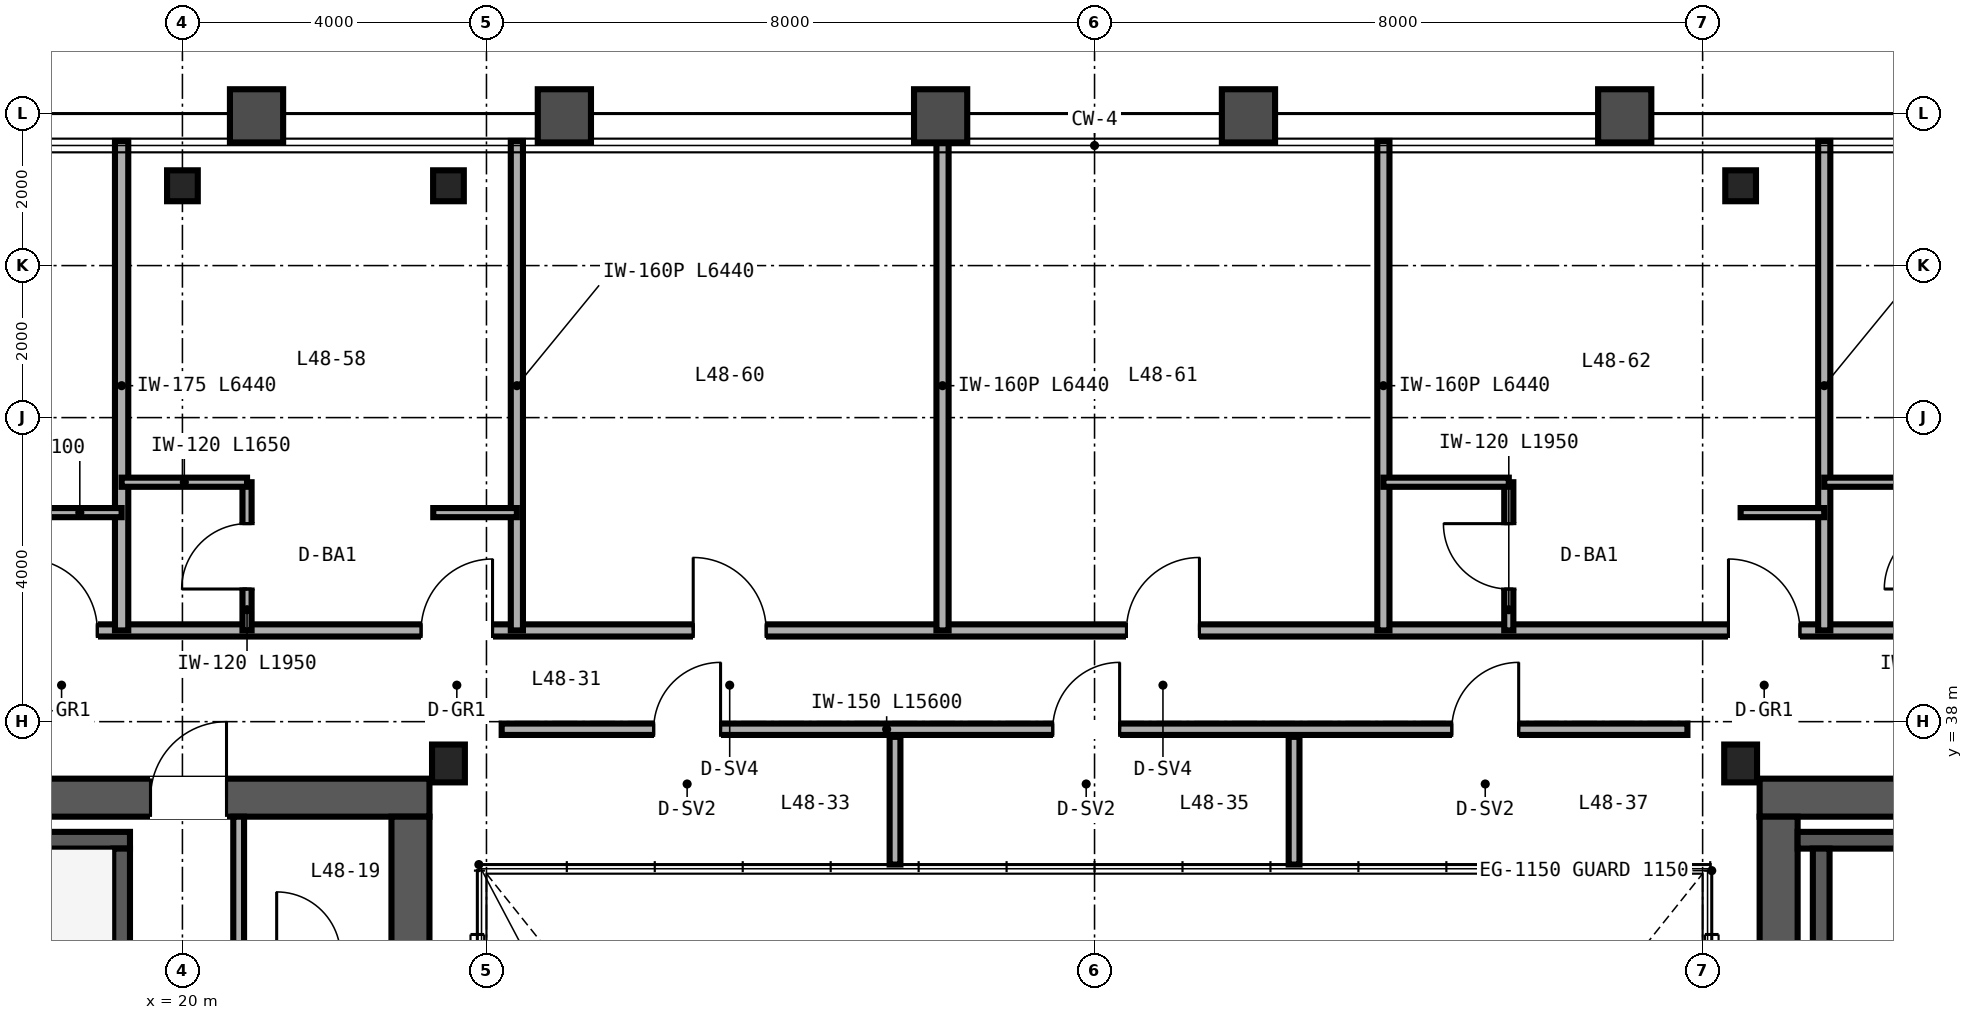
"""IFC4 building model, lengths in metres.
Left out: names, types, materials, properties, quantities, classifications, styles, units other than length and angle.
Written with IfcOpenShell. Run it as: python <this file> out.ifc"""

import sys

from ifc_helpers import new_model, si_unit, direction, frame, frame_2d, origin, origin_2d, place, context, subcontext, project, spatial, rectangle, i_section, extrude, source, transform, mapped, element, fill, save


model = new_model("IFC4")
c1 = context("Model", 3, precision=1e-05, world=origin(), true_north=direction((0.0, 1.0)))
c2 = subcontext(c1, "Body", "Model", "MODEL_VIEW")
j1 = project(units=[si_unit("LENGTHUNIT", "METRE"), si_unit("PLANEANGLEUNIT", "RADIAN")], contexts=[c1])
p1 = place(None, origin())
s1 = spatial("IfcSite", under=j1, at=p1, CompositionType="ELEMENT")
p2 = place(p1, origin())
s2 = spatial("IfcBuilding", under=s1, at=p2, CompositionType="ELEMENT")
p3 = place(p2, frame((0.0, 0.0, 192.0)))
s3 = spatial("IfcBuildingStorey", under=s2, at=p3, CompositionType="ELEMENT", Elevation=192.0)
p4 = place(p3, frame((10.75, 37.0, 0.0), z_axis=(0.0, 0.0, 1.0), x_axis=(1.0, 0.0, 0.0)))
e1 = element("IfcWall", 1, at=p4, inside=s3, PredefinedType="SHEAR", context=c2, shape_type="SweptSolid", body=[
    extrude(rectangle(XDim=12.5, YDim=0.5, at=frame_2d((6.25, 0.0))), origin(), (0.0, 0.0, 1.0), 3.37),
])
p5 = place(p4, frame((8.83, 0.0, 0.0)))
e2 = element("IfcOpeningElement", 2, at=p5, cuts=e1, PredefinedType="OPENING", context=c2, shape_type="SweptSolid", body=[
    extrude(rectangle(XDim=1.0, YDim=2.15, at=frame_2d((0.5, 1.075))), frame((0.0, 0.26, 0.0), z_axis=(0.0, -1.0, 0.0), x_axis=(1.0, 0.0, 0.0)), (0.0, 0.0, 1.0), 0.52),
])
p6 = place(p3, frame((23.0, 15.25, 0.0), z_axis=(0.0, 0.0, 1.0), x_axis=(0.0, 1.0, 0.0)))
e3 = element("IfcWall", 3, at=p6, inside=s3, PredefinedType="SHEAR", context=c2, shape_type="SweptSolid", body=[
    extrude(rectangle(XDim=21.5, YDim=0.5, at=frame_2d((10.75, 0.0))), origin(), (0.0, 0.0, 1.0), 3.37),
])
p7 = place(p3, frame((40.75, 37.0, 0.0), z_axis=(0.0, 0.0, 1.0), x_axis=(1.0, 0.0, 0.0)))
e4 = element("IfcWall", 4, at=p7, inside=s3, PredefinedType="SHEAR", context=c2, shape_type="SweptSolid", body=[
    extrude(rectangle(XDim=12.5, YDim=0.5, at=frame_2d((6.25, 0.0))), origin(), (0.0, 0.0, 1.0), 3.37),
])
p8 = place(p7, frame((9.95, 0.0, 0.0)))
e5 = element("IfcOpeningElement", 5, at=p8, cuts=e4, PredefinedType="OPENING", context=c2, shape_type="SweptSolid", body=[
    extrude(rectangle(XDim=1.1, YDim=2.15, at=frame_2d((0.55, 1.075))), frame((0.0, 0.26, 0.0), z_axis=(0.0, -1.0, 0.0), x_axis=(1.0, 0.0, 0.0)), (0.0, 0.0, 1.0), 0.52),
])
p9 = place(p3, frame((41.0, 15.25, 0.0), z_axis=(0.0, 0.0, 1.0), x_axis=(0.0, 1.0, 0.0)))
e6 = element("IfcWall", 6, at=p9, inside=s3, PredefinedType="SHEAR", context=c2, shape_type="SweptSolid", body=[
    extrude(rectangle(XDim=21.5, YDim=0.5, at=frame_2d((10.75, 0.0))), origin(), (0.0, 0.0, 1.0), 3.37),
])
p10 = place(p3, frame((11.25, 36.44, 0.0), z_axis=(0.0, 0.0, 1.0), x_axis=(1.0, 0.0, 0.0)))
e7 = element("IfcWall", 7, at=p10, inside=s3, PredefinedType="SHEAR", context=c2, shape_type="SweptSolid", body=[
    extrude(rectangle(XDim=8.06, YDim=0.22, at=frame_2d((4.03, 0.0))), origin(), (0.0, 0.0, 1.0), 3.4),
])
p11 = place(p3, frame((19.2, 33.05, 0.0), z_axis=(0.0, 0.0, 1.0), x_axis=(0.0, 1.0, 0.0)))
e8 = element("IfcWall", 8, at=p11, inside=s3, PredefinedType="SHEAR", context=c2, shape_type="SweptSolid", body=[
    extrude(rectangle(XDim=3.28, YDim=0.22, at=frame_2d((1.64, 0.0))), origin(), (0.0, 0.0, 1.0), 3.4),
])
p12 = place(p3, frame((41.25, 36.44, 0.0), z_axis=(0.0, 0.0, 1.0), x_axis=(1.0, 0.0, 0.0)))
e9 = element("IfcWall", 9, at=p12, inside=s3, PredefinedType="SHEAR", context=c2, shape_type="SweptSolid", body=[
    extrude(rectangle(XDim=8.06, YDim=0.22, at=frame_2d((4.03, 0.0))), origin(), (0.0, 0.0, 1.0), 3.4),
])
p13 = place(p3, frame((41.56, 33.05, 0.0), z_axis=(0.0, 0.0, 1.0), x_axis=(0.0, 1.0, 0.0)))
e10 = element("IfcWall", 10, at=p13, inside=s3, PredefinedType="SHEAR", context=c2, shape_type="SweptSolid", body=[
    extrude(rectangle(XDim=3.28, YDim=0.22, at=frame_2d((1.64, 0.0))), origin(), (0.0, 0.0, 1.0), 3.4),
])
m1 = source(origin(), c2, "Body", "SweptSolid", [
    extrude(i_section(OverallWidth=0.432, OverallDepth=0.498, WebThickness=0.056, FlangeThickness=0.089, FilletRadius=0.025, at=origin_2d()), origin(), (0.0, 0.0, 1.0), 3.37),
])
for number, where, z_axis, x_axis in (
    (11, (23.5, 37.45, 0.0), (0.0, 0.0, 1.0), (1.0, 0.0, 0.0)),
    (12, (40.5, 37.45, 0.0), (0.0, 0.0, 1.0), (1.0, 0.0, 0.0)),
):
    element("IfcColumn", number, at=place(p3, frame(where, z_axis=z_axis, x_axis=x_axis)), inside=s3, PredefinedType="COLUMN", context=c2, shape_type="MappedRepresentation", body=[
        mapped(m1, transform((0.0, 0.0, 0.0), scale=1.0)),
    ])
m2 = source(origin(), c2, "Body", "SweptSolid", [
    extrude(i_section(OverallWidth=0.404, OverallDepth=0.407, WebThickness=0.027, FlangeThickness=0.044, FilletRadius=0.025, at=origin_2d()), origin(), (0.0, 0.0, 1.0), 3.37),
])
for number, where, z_axis, x_axis in (
    (13, (20.0, 45.05, 0.0), (0.0, 0.0, 1.0), (1.0, 0.0, 0.0)),
    (14, (23.5, 45.05, 0.0), (0.0, 0.0, 1.0), (1.0, 0.0, 0.0)),
    (15, (40.5, 45.05, 0.0), (0.0, 0.0, 1.0), (1.0, 0.0, 0.0)),
):
    element("IfcColumn", number, at=place(p3, frame(where, z_axis=z_axis, x_axis=x_axis)), inside=s3, PredefinedType="COLUMN", context=c2, shape_type="MappedRepresentation", body=[
        mapped(m2, transform((0.0, 0.0, 0.0), scale=1.0)),
    ])
p14 = place(p3, frame((20.74, 34.92, 0.0), z_axis=(0.0, 0.0, 1.0), x_axis=(0.0, 1.0, 0.0)))
e16 = element("IfcWall", 16, at=p14, inside=s3, PredefinedType="PARTITIONING", context=c2, shape_type="SweptSolid", body=[
    extrude(rectangle(XDim=1.83, YDim=0.142, at=frame_2d((0.915, 0.0))), origin(), (0.0, 0.0, 1.0), 3.37),
])
p15 = place(p3, frame((24.2, 37.9, 0.0), z_axis=(0.0, 0.0, 1.0), x_axis=(1.0, 0.0, 0.0)))
e17 = element("IfcWall", 17, at=p15, inside=s3, PredefinedType="PARTITIONING", context=c2, shape_type="SweptSolid", body=[
    extrude(rectangle(XDim=15.6, YDim=0.15, at=frame_2d((7.8, 0.0))), origin(), (0.0, 0.0, 1.0), 3.37),
])
p16 = place(p15, frame((2.0, 0.0, 0.0)))
e18 = element("IfcOpeningElement", 18, at=p16, cuts=e17, PredefinedType="OPENING", context=c2, shape_type="SweptSolid", body=[
    extrude(rectangle(XDim=0.88, YDim=2.15, at=frame_2d((0.44, 1.075))), frame((0.0, 0.085, 0.0), z_axis=(0.0, -1.0, 0.0), x_axis=(1.0, 0.0, 0.0)), (0.0, 0.0, 1.0), 0.17),
])
p17 = place(p15, frame((7.25, 0.0, 0.0)))
e19 = element("IfcOpeningElement", 19, at=p17, cuts=e17, PredefinedType="OPENING", context=c2, shape_type="SweptSolid", body=[
    extrude(rectangle(XDim=0.88, YDim=2.15, at=frame_2d((0.44, 1.075))), frame((0.0, 0.085, 0.0), z_axis=(0.0, -1.0, 0.0), x_axis=(1.0, 0.0, 0.0)), (0.0, 0.0, 1.0), 0.17),
])
p18 = place(p15, frame((12.5, 0.0, 0.0)))
e20 = element("IfcOpeningElement", 20, at=p18, cuts=e17, PredefinedType="OPENING", context=c2, shape_type="SweptSolid", body=[
    extrude(rectangle(XDim=0.88, YDim=2.15, at=frame_2d((0.44, 1.075))), frame((0.0, 0.085, 0.0), z_axis=(0.0, -1.0, 0.0), x_axis=(1.0, 0.0, 0.0)), (0.0, 0.0, 1.0), 0.17),
])
for number, where, z_axis, x_axis in (
    (21, (29.375, 36.12, 0.0), (0.0, 0.0, 1.0), (0.0, 1.0, 0.0)),
    (22, (34.625, 36.12, 0.0), (0.0, 0.0, 1.0), (0.0, 1.0, 0.0)),
):
    element("IfcWall", number, at=place(p3, frame(where, z_axis=z_axis, x_axis=x_axis)), inside=s3, PredefinedType="PARTITIONING", context=c2, shape_type="SweptSolid", body=[
        extrude(rectangle(XDim=1.68, YDim=0.142, at=frame_2d((0.84, 0.0))), origin(), (0.0, 0.0, 1.0), 3.37),
    ])
p19 = place(p3, frame((14.0, 39.2, 0.0), z_axis=(0.0, 0.0, 1.0), x_axis=(1.0, 0.0, 0.0)))
e23 = element("IfcWall", 23, at=p19, inside=s3, PredefinedType="PARTITIONING", context=c2, shape_type="SweptSolid", body=[
    extrude(rectangle(XDim=36.0, YDim=0.16, at=frame_2d((18.0, 0.0))), origin(), (0.0, 0.0, 1.0), 2.913),
])
p20 = place(p19, frame((3.94, 0.0, 0.0)))
e24 = element("IfcOpeningElement", 24, at=p20, cuts=e23, PredefinedType="OPENING", context=c2, shape_type="SweptSolid", body=[
    extrude(rectangle(XDim=0.94, YDim=2.15, at=frame_2d((0.47, 1.075))), frame((0.0, 0.09, 0.0), z_axis=(0.0, -1.0, 0.0), x_axis=(1.0, 0.0, 0.0)), (0.0, 0.0, 1.0), 0.18),
])
p21 = place(p19, frame((9.14, 0.0, 0.0)))
e25 = element("IfcOpeningElement", 25, at=p21, cuts=e23, PredefinedType="OPENING", context=c2, shape_type="SweptSolid", body=[
    extrude(rectangle(XDim=0.94, YDim=2.15, at=frame_2d((0.47, 1.075))), frame((0.0, 0.09, 0.0), z_axis=(0.0, -1.0, 0.0), x_axis=(1.0, 0.0, 0.0)), (0.0, 0.0, 1.0), 0.18),
])
p22 = place(p19, frame((12.72, 0.0, 0.0)))
e26 = element("IfcOpeningElement", 26, at=p22, cuts=e23, PredefinedType="OPENING", context=c2, shape_type="SweptSolid", body=[
    extrude(rectangle(XDim=0.96, YDim=2.15, at=frame_2d((0.48, 1.075))), frame((0.0, 0.09, 0.0), z_axis=(0.0, -1.0, 0.0), x_axis=(1.0, 0.0, 0.0)), (0.0, 0.0, 1.0), 0.18),
])
p23 = place(p19, frame((18.42, 0.0, 0.0)))
e27 = element("IfcOpeningElement", 27, at=p23, cuts=e23, PredefinedType="OPENING", context=c2, shape_type="SweptSolid", body=[
    extrude(rectangle(XDim=0.96, YDim=2.15, at=frame_2d((0.48, 1.075))), frame((0.0, 0.09, 0.0), z_axis=(0.0, -1.0, 0.0), x_axis=(1.0, 0.0, 0.0)), (0.0, 0.0, 1.0), 0.18),
])
p24 = place(p19, frame((26.34, 0.0, 0.0)))
e28 = element("IfcOpeningElement", 28, at=p24, cuts=e23, PredefinedType="OPENING", context=c2, shape_type="SweptSolid", body=[
    extrude(rectangle(XDim=0.94, YDim=2.15, at=frame_2d((0.47, 1.075))), frame((0.0, 0.09, 0.0), z_axis=(0.0, -1.0, 0.0), x_axis=(1.0, 0.0, 0.0)), (0.0, 0.0, 1.0), 0.18),
])
p25 = place(p19, frame((30.54, 0.0, 0.0)))
e29 = element("IfcOpeningElement", 29, at=p25, cuts=e23, PredefinedType="OPENING", context=c2, shape_type="SweptSolid", body=[
    extrude(rectangle(XDim=0.94, YDim=2.15, at=frame_2d((0.47, 1.075))), frame((0.0, 0.09, 0.0), z_axis=(0.0, -1.0, 0.0), x_axis=(1.0, 0.0, 0.0)), (0.0, 0.0, 1.0), 0.18),
])
p26 = place(p19, frame((34.74, 0.0, 0.0)))
e30 = element("IfcOpeningElement", 30, at=p26, cuts=e23, PredefinedType="OPENING", context=c2, shape_type="SweptSolid", body=[
    extrude(rectangle(XDim=0.94, YDim=2.15, at=frame_2d((0.47, 1.075))), frame((0.0, 0.09, 0.0), z_axis=(0.0, -1.0, 0.0), x_axis=(1.0, 0.0, 0.0)), (0.0, 0.0, 1.0), 0.18),
])
p27 = place(p3, frame((19.2, 39.2, 0.0), z_axis=(0.0, 0.0, 1.0), x_axis=(0.0, 1.0, 0.0)))
e31 = element("IfcWall", 31, at=p27, inside=s3, PredefinedType="PARTITIONING", context=c2, shape_type="SweptSolid", body=[
    extrude(rectangle(XDim=6.44, YDim=0.175, at=frame_2d((3.22, 0.0))), origin(), (0.0, 0.0, 1.0), 2.677),
])
p28 = place(p3, frame((18.1, 40.75, 0.0), z_axis=(0.0, 0.0, 1.0), x_axis=(1.0, 0.0, 0.0)))
e32 = element("IfcWall", 32, at=p28, inside=s3, PredefinedType="PARTITIONING", context=c2, shape_type="SweptSolid", body=[
    extrude(rectangle(XDim=1.1, YDim=0.12, at=frame_2d((0.55, 0.0))), origin(), (0.0, 0.0, 1.0), 3.37),
])
p29 = place(p3, frame((24.4, 39.2, 0.0), z_axis=(0.0, 0.0, 1.0), x_axis=(0.0, 1.0, 0.0)))
e33 = element("IfcWall", 33, at=p29, inside=s3, PredefinedType="PARTITIONING", context=c2, shape_type="SweptSolid", body=[
    extrude(rectangle(XDim=6.44, YDim=0.16, at=frame_2d((3.22, 0.0))), origin(), (0.0, 0.0, 1.0), 2.443),
])
p30 = place(p3, frame((20.85, 39.2, 0.0), z_axis=(0.0, 0.0, 1.0), x_axis=(0.0, 1.0, 0.0)))
e34 = element("IfcWall", 34, at=p30, inside=s3, PredefinedType="PARTITIONING", context=c2, shape_type="SweptSolid", body=[
    extrude(rectangle(XDim=1.95, YDim=0.12, at=frame_2d((0.975, 0.0))), origin(), (0.0, 0.0, 1.0), 3.37),
])
p31 = place(p30, frame((0.545, 0.0, 0.0)))
e35 = element("IfcOpeningElement", 35, at=p31, cuts=e34, PredefinedType="OPENING", context=c2, shape_type="SweptSolid", body=[
    extrude(rectangle(XDim=0.86, YDim=2.1, at=frame_2d((0.43, 1.05))), frame((0.0, 0.07, 0.0), z_axis=(0.0, -1.0, 0.0), x_axis=(1.0, 0.0, 0.0)), (0.0, 0.0, 1.0), 0.14),
])
p32 = place(p3, frame((19.2, 41.15, 0.0), z_axis=(0.0, 0.0, 1.0), x_axis=(1.0, 0.0, 0.0)))
e36 = element("IfcWall", 36, at=p32, inside=s3, PredefinedType="PARTITIONING", context=c2, shape_type="SweptSolid", body=[
    extrude(rectangle(XDim=1.65, YDim=0.12, at=frame_2d((0.825, 0.0))), origin(), (0.0, 0.0, 1.0), 3.37),
])
p33 = place(p3, frame((23.3, 40.75, 0.0), z_axis=(0.0, 0.0, 1.0), x_axis=(1.0, 0.0, 0.0)))
e37 = element("IfcWall", 37, at=p33, inside=s3, PredefinedType="PARTITIONING", context=c2, shape_type="SweptSolid", body=[
    extrude(rectangle(XDim=1.1, YDim=0.12, at=frame_2d((0.55, 0.0))), origin(), (0.0, 0.0, 1.0), 2.913),
])
for number, where, z_axis, x_axis in (
    (38, (30.0, 39.2, 0.0), (0.0, 0.0, 1.0), (0.0, 1.0, 0.0)),
    (39, (35.8, 39.2, 0.0), (0.0, 0.0, 1.0), (0.0, 1.0, 0.0)),
):
    element("IfcWall", number, at=place(p3, frame(where, z_axis=z_axis, x_axis=x_axis)), inside=s3, PredefinedType="PARTITIONING", context=c2, shape_type="SweptSolid", body=[
        extrude(rectangle(XDim=6.44, YDim=0.16, at=frame_2d((3.22, 0.0))), origin(), (0.0, 0.0, 1.0), 2.443),
    ])
p34 = place(p3, frame((41.6, 39.2, 0.0), z_axis=(0.0, 0.0, 1.0), x_axis=(0.0, 1.0, 0.0)))
e40 = element("IfcWall", 40, at=p34, inside=s3, PredefinedType="PARTITIONING", context=c2, shape_type="SweptSolid", body=[
    extrude(rectangle(XDim=6.44, YDim=0.16, at=frame_2d((3.22, 0.0))), origin(), (0.0, 0.0, 1.0), 2.833),
])
p35 = place(p3, frame((37.45, 39.2, 0.0), z_axis=(0.0, 0.0, 1.0), x_axis=(0.0, 1.0, 0.0)))
e41 = element("IfcWall", 41, at=p35, inside=s3, PredefinedType="PARTITIONING", context=c2, shape_type="SweptSolid", body=[
    extrude(rectangle(XDim=1.95, YDim=0.12, at=frame_2d((0.975, 0.0))), origin(), (0.0, 0.0, 1.0), 3.37),
])
p36 = place(p35, frame((0.545, 0.0, 0.0)))
e42 = element("IfcOpeningElement", 42, at=p36, cuts=e41, PredefinedType="OPENING", context=c2, shape_type="SweptSolid", body=[
    extrude(rectangle(XDim=0.86, YDim=2.1, at=frame_2d((0.43, 1.05))), frame((0.0, 0.07, 0.0), z_axis=(0.0, -1.0, 0.0), x_axis=(1.0, 0.0, 0.0)), (0.0, 0.0, 1.0), 0.14),
])
p37 = place(p3, frame((35.8, 41.15, 0.0), z_axis=(0.0, 0.0, 1.0), x_axis=(1.0, 0.0, 0.0)))
e43 = element("IfcWall", 43, at=p37, inside=s3, PredefinedType="PARTITIONING", context=c2, shape_type="SweptSolid", body=[
    extrude(rectangle(XDim=1.65, YDim=0.12, at=frame_2d((0.825, 0.0))), origin(), (0.0, 0.0, 1.0), 3.37),
])
p38 = place(p3, frame((40.5, 40.75, 0.0), z_axis=(0.0, 0.0, 1.0), x_axis=(1.0, 0.0, 0.0)))
e44 = element("IfcWall", 44, at=p38, inside=s3, PredefinedType="PARTITIONING", context=c2, shape_type="SweptSolid", body=[
    extrude(rectangle(XDim=1.1, YDim=0.12, at=frame_2d((0.55, 0.0))), origin(), (0.0, 0.0, 1.0), 2.913),
])
p39 = place(p3, frame((41.6, 41.15, 0.0), z_axis=(0.0, 0.0, 1.0), x_axis=(1.0, 0.0, 0.0)))
e45 = element("IfcWall", 45, at=p39, inside=s3, PredefinedType="PARTITIONING", context=c2, shape_type="SweptSolid", body=[
    extrude(rectangle(XDim=1.65, YDim=0.12, at=frame_2d((0.825, 0.0))), origin(), (0.0, 0.0, 1.0), 3.37),
])
m3 = source(origin(), c2, "Body", "SweptSolid", [
    extrude(rectangle(XDim=1.0, YDim=2.15, at=frame_2d((0.5, 1.075))), frame((0.0, 0.025, 0.0), z_axis=(0.0, -1.0, 0.0), x_axis=(1.0, 0.0, 0.0)), (0.0, 0.0, 1.0), 0.05),
])
p40 = place(p5, origin())
e46 = element("IfcDoor", 46, at=p40, inside=s3, OperationType="SINGLE_SWING_RIGHT", PredefinedType="DOOR", context=c2, shape_type="MappedRepresentation", body=[
    mapped(m3, transform((0.0, 0.0, 0.0), scale=1.0)),
])
fill(e2, e46)
m4 = source(origin(), c2, "Body", "SweptSolid", [
    extrude(rectangle(XDim=0.88, YDim=2.15, at=frame_2d((0.44, 1.075))), frame((0.0, 0.025, 0.0), z_axis=(0.0, -1.0, 0.0), x_axis=(1.0, 0.0, 0.0)), (0.0, 0.0, 1.0), 0.05),
])
p41 = place(p16, origin())
e47 = element("IfcDoor", 47, at=p41, inside=s3, OperationType="SINGLE_SWING_RIGHT", PredefinedType="DOOR", context=c2, shape_type="MappedRepresentation", body=[
    mapped(m4, transform((0.0, 0.0, 0.0), scale=1.0)),
])
fill(e18, e47)
p42 = place(p17, origin())
e48 = element("IfcDoor", 48, at=p42, inside=s3, OperationType="SINGLE_SWING_RIGHT", PredefinedType="DOOR", context=c2, shape_type="MappedRepresentation", body=[
    mapped(m4, transform((0.0, 0.0, 0.0), scale=1.0)),
])
fill(e19, e48)
p43 = place(p18, origin())
e49 = element("IfcDoor", 49, at=p43, inside=s3, OperationType="SINGLE_SWING_RIGHT", PredefinedType="DOOR", context=c2, shape_type="MappedRepresentation", body=[
    mapped(m4, transform((0.0, 0.0, 0.0), scale=1.0)),
])
fill(e20, e49)
m5 = source(origin(), c2, "Body", "SweptSolid", [
    extrude(rectangle(XDim=0.86, YDim=2.1, at=frame_2d((0.43, 1.05))), frame((0.0, 0.025, 0.0), z_axis=(0.0, -1.0, 0.0), x_axis=(1.0, 0.0, 0.0)), (0.0, 0.0, 1.0), 0.05),
])
p44 = place(p31, origin())
e50 = element("IfcDoor", 50, at=p44, inside=s3, OperationType="SINGLE_SWING_LEFT", PredefinedType="DOOR", context=c2, shape_type="MappedRepresentation", body=[
    mapped(m5, transform((0.0, 0.0, 0.0), scale=1.0)),
])
fill(e35, e50)
p45 = place(p36, origin())
e51 = element("IfcDoor", 51, at=p45, inside=s3, OperationType="SINGLE_SWING_RIGHT", PredefinedType="DOOR", context=c2, shape_type="MappedRepresentation", body=[
    mapped(m5, transform((0.0, 0.0, 0.0), scale=1.0)),
])
fill(e42, e51)
m6 = source(origin(), c2, "Body", "SweptSolid", [
    extrude(rectangle(XDim=0.94, YDim=2.15, at=frame_2d((0.47, 1.075))), frame((0.0, 0.025, 0.0), z_axis=(0.0, -1.0, 0.0), x_axis=(1.0, 0.0, 0.0)), (0.0, 0.0, 1.0), 0.05),
])
p46 = place(p20, origin())
e52 = element("IfcDoor", 52, at=p46, inside=s3, OperationType="SINGLE_SWING_LEFT", PredefinedType="DOOR", context=c2, shape_type="MappedRepresentation", body=[
    mapped(m6, transform((0.0, 0.0, 0.0), scale=1.0)),
])
fill(e24, e52)
p47 = place(p21, origin())
e53 = element("IfcDoor", 53, at=p47, inside=s3, OperationType="SINGLE_SWING_RIGHT", PredefinedType="DOOR", context=c2, shape_type="MappedRepresentation", body=[
    mapped(m6, transform((0.0, 0.0, 0.0), scale=1.0)),
])
fill(e25, e53)
m7 = source(origin(), c2, "Body", "SweptSolid", [
    extrude(rectangle(XDim=0.96, YDim=2.15, at=frame_2d((0.48, 1.075))), frame((0.0, 0.025, 0.0), z_axis=(0.0, -1.0, 0.0), x_axis=(1.0, 0.0, 0.0)), (0.0, 0.0, 1.0), 0.05),
])
p48 = place(p22, origin())
e54 = element("IfcDoor", 54, at=p48, inside=s3, OperationType="SINGLE_SWING_LEFT", PredefinedType="DOOR", context=c2, shape_type="MappedRepresentation", body=[
    mapped(m7, transform((0.0, 0.0, 0.0), scale=1.0)),
])
fill(e26, e54)
p49 = place(p23, origin())
e55 = element("IfcDoor", 55, at=p49, inside=s3, OperationType="SINGLE_SWING_RIGHT", PredefinedType="DOOR", context=c2, shape_type="MappedRepresentation", body=[
    mapped(m7, transform((0.0, 0.0, 0.0), scale=1.0)),
])
fill(e27, e55)
p50 = place(p24, origin())
e56 = element("IfcDoor", 56, at=p50, inside=s3, OperationType="SINGLE_SWING_LEFT", PredefinedType="DOOR", context=c2, shape_type="MappedRepresentation", body=[
    mapped(m6, transform((0.0, 0.0, 0.0), scale=1.0)),
])
fill(e28, e56)
save(model, sys.argv[1])
